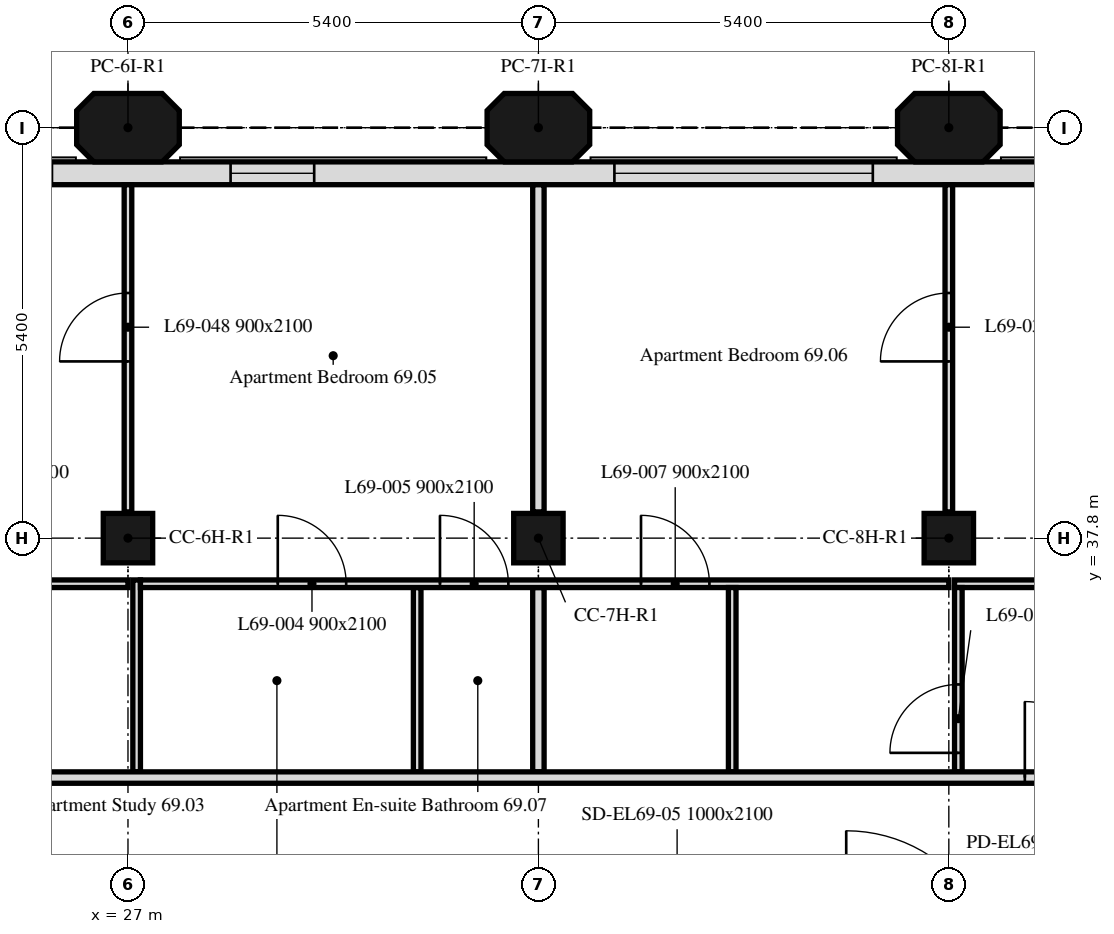
"""IFC4 building model, lengths in metres.
Left out: names, types, materials, properties, quantities, classifications, styles, units other than length and angle.
Written with IfcOpenShell. Run it as: python <this file> out.ifc"""

import sys

from ifc_helpers import new_model, si_unit, direction, frame, frame_2d, origin, origin_2d, place, context, subcontext, project, spatial, polyline, rectangle, outline, extrude, element, fill, save


model = new_model("IFC4")
c1 = context("Model", 3, precision=1e-05, world=origin(), true_north=direction((0.0, 1.0)))
c2 = subcontext(c1, "Body", "Model", "MODEL_VIEW")
j1 = project(units=[si_unit("LENGTHUNIT", "METRE"), si_unit("PLANEANGLEUNIT", "RADIAN")], contexts=[c1])
p1 = place(None, origin())
s1 = spatial("IfcSite", under=j1, at=p1, CompositionType="ELEMENT")
p2 = place(p1, origin())
s2 = spatial("IfcBuilding", under=s1, at=p2, CompositionType="ELEMENT")
p3 = place(p2, frame((0.0, 0.0, 281.8)))
s3 = spatial("IfcBuildingStorey", under=s2, at=p3, CompositionType="ELEMENT", Elevation=281.8)
for number, where, z_axis, x_axis in (
    (1, (27.0, 37.8, 0.0), (0.0, 0.0, 1.0), (1.0, 0.0, 0.0)),
    (2, (32.4, 37.8, 0.0), (0.0, 0.0, 1.0), (1.0, 0.0, 0.0)),
    (3, (37.8, 37.8, 0.0), (0.0, 0.0, 1.0), (1.0, 0.0, 0.0)),
):
    element("IfcColumn", number, at=place(p3, frame(where, z_axis=z_axis, x_axis=x_axis)), inside=s3, PredefinedType="COLUMN", context=c2, shape_type="SweptSolid", body=[
        extrude(rectangle(XDim=0.65, YDim=0.65, at=origin_2d()), origin(), (0.0, 0.0, 1.0), 3.0),
    ])
for number, where, z_axis, x_axis in (
    (4, (27.0, 43.2, 0.0), (0.0, 0.0, 1.0), (1.0, 0.0, 0.0)),
    (5, (32.4, 43.2, 0.0), (0.0, 0.0, 1.0), (1.0, 0.0, 0.0)),
    (6, (37.8, 43.2, 0.0), (0.0, 0.0, 1.0), (1.0, 0.0, 0.0)),
):
    element("IfcColumn", number, at=place(p3, frame(where, z_axis=z_axis, x_axis=x_axis)), inside=s3, PredefinedType="COLUMN", context=c2, shape_type="SweptSolid", body=[
        extrude(outline(polyline([(-0.45, -0.45), (0.45, -0.45), (0.675, -0.225), (0.675, 0.225), (0.45, 0.45), (-0.45, 0.45), (-0.675, 0.225), (-0.675, -0.225), (-0.45, -0.45)])), origin(), (0.0, 0.0, 1.0), 3.0),
    ])
p4 = place(p3, frame((43.014, 42.6, 0.0), z_axis=(0.0, 0.0, 1.0), x_axis=(-1.0, 0.0, 0.0)))
e7 = element("IfcWall", 7, at=p4, inside=s3, PredefinedType="SOLIDWALL", context=c2, shape_type="SweptSolid", body=[
    extrude(rectangle(XDim=32.027, YDim=0.3, at=frame_2d((16.014, 0.0))), origin(), (0.0, 0.0, 1.0), 3.0),
])
p5 = place(p4, frame((2.764, 0.0, 0.9)))
e8 = element("IfcOpeningElement", 8, at=p5, cuts=e7, PredefinedType="OPENING", context=c2, shape_type="SweptSolid", body=[
    extrude(rectangle(XDim=1.1, YDim=1.7, at=frame_2d((0.55, 0.85))), frame((0.0, 0.16, 0.0), z_axis=(0.0, -1.0, 0.0), x_axis=(1.0, 0.0, 0.0)), (0.0, 0.0, 1.0), 0.32),
])
p6 = place(p4, frame((6.214, 0.0, 0.9)))
e9 = element("IfcOpeningElement", 9, at=p6, cuts=e7, PredefinedType="OPENING", context=c2, shape_type="SweptSolid", body=[
    extrude(rectangle(XDim=3.4, YDim=1.7, at=frame_2d((1.7, 0.85))), frame((0.0, 0.16, 0.0), z_axis=(0.0, -1.0, 0.0), x_axis=(1.0, 0.0, 0.0)), (0.0, 0.0, 1.0), 0.32),
])
p7 = place(p4, frame((13.564, 0.0, 0.9)))
e10 = element("IfcOpeningElement", 10, at=p7, cuts=e7, PredefinedType="OPENING", context=c2, shape_type="SweptSolid", body=[
    extrude(rectangle(XDim=1.1, YDim=1.7, at=frame_2d((0.55, 0.85))), frame((0.0, 0.16, 0.0), z_axis=(0.0, -1.0, 0.0), x_axis=(1.0, 0.0, 0.0)), (0.0, 0.0, 1.0), 0.32),
])
p8 = place(p4, frame((17.014, 0.0, 0.9)))
e11 = element("IfcOpeningElement", 11, at=p8, cuts=e7, PredefinedType="OPENING", context=c2, shape_type="SweptSolid", body=[
    extrude(rectangle(XDim=3.4, YDim=1.7, at=frame_2d((1.7, 0.85))), frame((0.0, 0.16, 0.0), z_axis=(0.0, -1.0, 0.0), x_axis=(1.0, 0.0, 0.0)), (0.0, 0.0, 1.0), 0.32),
])
p9 = place(p4, frame((24.364, 0.0, 0.9)))
e12 = element("IfcOpeningElement", 12, at=p9, cuts=e7, PredefinedType="OPENING", context=c2, shape_type="SweptSolid", body=[
    extrude(rectangle(XDim=1.1, YDim=1.7, at=frame_2d((0.55, 0.85))), frame((0.0, 0.16, 0.0), z_axis=(0.0, -1.0, 0.0), x_axis=(1.0, 0.0, 0.0)), (0.0, 0.0, 1.0), 0.32),
])
p10 = place(p4, frame((27.814, 0.0, 0.9)))
e13 = element("IfcOpeningElement", 13, at=p10, cuts=e7, PredefinedType="OPENING", context=c2, shape_type="SweptSolid", body=[
    extrude(rectangle(XDim=3.4, YDim=1.7, at=frame_2d((1.7, 0.85))), frame((0.0, 0.16, 0.0), z_axis=(0.0, -1.0, 0.0), x_axis=(1.0, 0.0, 0.0)), (0.0, 0.0, 1.0), 0.32),
])
p11 = place(p3, frame((10.8, 37.2, 0.0), z_axis=(0.0, 0.0, 1.0), x_axis=(1.0, 0.0, 0.0)))
e14 = element("IfcWall", 14, at=p11, inside=s3, PredefinedType="PARTITIONING", context=c2, shape_type="SweptSolid", body=[
    extrude(rectangle(XDim=16.2, YDim=0.1, at=frame_2d((8.1, 0.0))), origin(), (0.0, 0.0, 1.0), 3.0),
])
p12 = place(p11, frame((2.995, 0.0, 0.0)))
e15 = element("IfcOpeningElement", 15, at=p12, cuts=e14, PredefinedType="OPENING", context=c2, shape_type="SweptSolid", body=[
    extrude(rectangle(XDim=0.9, YDim=2.1, at=frame_2d((0.45, 1.05))), frame((0.0, 0.05, 0.0), z_axis=(0.0, -1.0, 0.0), x_axis=(1.0, 0.0, 0.0)), (0.0, 0.0, 1.0), 0.1),
])
p13 = place(p11, frame((13.996, 0.0, 0.0)))
e16 = element("IfcOpeningElement", 16, at=p13, cuts=e14, PredefinedType="OPENING", context=c2, shape_type="SweptSolid", body=[
    extrude(rectangle(XDim=0.9, YDim=2.1, at=frame_2d((0.45, 1.05))), frame((0.0, 0.05, 0.0), z_axis=(0.0, -1.0, 0.0), x_axis=(1.0, 0.0, 0.0)), (0.0, 0.0, 1.0), 0.1),
])
p14 = place(p11, frame((6.928, 0.0, 0.0)))
e17 = element("IfcOpeningElement", 17, at=p14, cuts=e14, PredefinedType="OPENING", context=c2, shape_type="SweptSolid", body=[
    extrude(rectangle(XDim=0.9, YDim=2.1, at=frame_2d((0.45, 1.05))), frame((0.0, 0.05, 0.0), z_axis=(0.0, -1.0, 0.0), x_axis=(1.0, 0.0, 0.0)), (0.0, 0.0, 1.0), 0.1),
])
p15 = place(p11, frame((8.428, 0.0, 0.0)))
e18 = element("IfcOpeningElement", 18, at=p15, cuts=e14, PredefinedType="OPENING", context=c2, shape_type="SweptSolid", body=[
    extrude(rectangle(XDim=0.9, YDim=2.1, at=frame_2d((0.45, 1.05))), frame((0.0, 0.05, 0.0), z_axis=(0.0, -1.0, 0.0), x_axis=(1.0, 0.0, 0.0)), (0.0, 0.0, 1.0), 0.1),
])
p16 = place(p3, frame((27.0, 38.145, 0.0), z_axis=(0.0, 0.0, 1.0), x_axis=(0.0, 1.0, 0.0)))
e19 = element("IfcWall", 19, at=p16, inside=s3, PredefinedType="PARTITIONING", context=c2, shape_type="SweptSolid", body=[
    extrude(rectangle(XDim=4.304, YDim=0.1, at=frame_2d((2.152, 0.0))), origin(), (0.0, 0.0, 1.0), 3.0),
])
p17 = place(p16, frame((1.98, 0.0, 0.0)))
e20 = element("IfcOpeningElement", 20, at=p17, cuts=e19, PredefinedType="OPENING", context=c2, shape_type="SweptSolid", body=[
    extrude(rectangle(XDim=0.9, YDim=2.1, at=frame_2d((0.45, 1.05))), frame((0.0, 0.05, 0.0), z_axis=(0.0, -1.0, 0.0), x_axis=(1.0, 0.0, 0.0)), (0.0, 0.0, 1.0), 0.1),
])
p18 = place(p3, frame((32.4, 38.145, 0.0), z_axis=(0.0, 0.0, 1.0), x_axis=(0.0, 1.0, 0.0)))
e21 = element("IfcWall", 21, at=p18, inside=s3, PredefinedType="PARTITIONING", context=c2, shape_type="SweptSolid", body=[
    extrude(rectangle(XDim=4.304, YDim=0.15, at=frame_2d((2.152, 0.0))), origin(), (0.0, 0.0, 1.0), 3.0),
])
p19 = place(p3, frame((27.114, 34.725, 0.0), z_axis=(0.0, 0.0, 1.0), x_axis=(0.0, 1.0, 0.0)))
e22 = element("IfcWall", 22, at=p19, inside=s3, PredefinedType="PARTITIONING", context=c2, shape_type="SweptSolid", body=[
    extrude(rectangle(XDim=2.525, YDim=0.1, at=frame_2d((1.262, 0.0))), origin(), (0.0, 0.0, 1.0), 3.0),
])
p20 = place(p3, frame((30.805, 34.725, 0.0), z_axis=(0.0, 0.0, 1.0), x_axis=(0.0, 1.0, 0.0)))
e23 = element("IfcWall", 23, at=p20, inside=s3, PredefinedType="PARTITIONING", context=c2, shape_type="SweptSolid", body=[
    extrude(rectangle(XDim=2.425, YDim=0.1, at=frame_2d((1.212, 0.0))), origin(), (0.0, 0.0, 1.0), 3.0),
])
p21 = place(p3, frame((32.4, 34.725, 0.0), z_axis=(0.0, 0.0, 1.0), x_axis=(0.0, 1.0, 0.0)))
e24 = element("IfcWall", 24, at=p21, inside=s3, PredefinedType="PARTITIONING", context=c2, shape_type="SweptSolid", body=[
    extrude(rectangle(XDim=2.425, YDim=0.15, at=frame_2d((1.212, 0.0))), origin(), (0.0, 0.0, 1.0), 3.0),
])
p22 = place(p3, frame((27.164, 37.2, 0.0), z_axis=(0.0, 0.0, 1.0), x_axis=(1.0, 0.0, 0.0)))
e25 = element("IfcWall", 25, at=p22, inside=s3, PredefinedType="PARTITIONING", context=c2, shape_type="SweptSolid", body=[
    extrude(rectangle(XDim=10.636, YDim=0.1, at=frame_2d((5.318, 0.0))), origin(), (0.0, 0.0, 1.0), 3.0),
])
p23 = place(p22, frame((1.807, 0.0, 0.0)))
e26 = element("IfcOpeningElement", 26, at=p23, cuts=e25, PredefinedType="OPENING", context=c2, shape_type="SweptSolid", body=[
    extrude(rectangle(XDim=0.9, YDim=2.1, at=frame_2d((0.45, 1.05))), frame((0.0, 0.05, 0.0), z_axis=(0.0, -1.0, 0.0), x_axis=(1.0, 0.0, 0.0)), (0.0, 0.0, 1.0), 0.1),
])
p24 = place(p22, frame((3.941, 0.0, 0.0)))
e27 = element("IfcOpeningElement", 27, at=p24, cuts=e25, PredefinedType="OPENING", context=c2, shape_type="SweptSolid", body=[
    extrude(rectangle(XDim=0.9, YDim=2.1, at=frame_2d((0.45, 1.05))), frame((0.0, 0.05, 0.0), z_axis=(0.0, -1.0, 0.0), x_axis=(1.0, 0.0, 0.0)), (0.0, 0.0, 1.0), 0.1),
])
p25 = place(p22, frame((6.586, 0.0, 0.0)))
e28 = element("IfcOpeningElement", 28, at=p25, cuts=e25, PredefinedType="OPENING", context=c2, shape_type="SweptSolid", body=[
    extrude(rectangle(XDim=0.9, YDim=2.1, at=frame_2d((0.45, 1.05))), frame((0.0, 0.05, 0.0), z_axis=(0.0, -1.0, 0.0), x_axis=(1.0, 0.0, 0.0)), (0.0, 0.0, 1.0), 0.1),
])
p26 = place(p3, frame((37.8, 38.145, 0.0), z_axis=(0.0, 0.0, 1.0), x_axis=(0.0, 1.0, 0.0)))
e29 = element("IfcWall", 29, at=p26, inside=s3, PredefinedType="PARTITIONING", context=c2, shape_type="SweptSolid", body=[
    extrude(rectangle(XDim=4.304, YDim=0.1, at=frame_2d((2.152, 0.0))), origin(), (0.0, 0.0, 1.0), 3.0),
])
p27 = place(p26, frame((1.98, 0.0, 0.0)))
e30 = element("IfcOpeningElement", 30, at=p27, cuts=e29, PredefinedType="OPENING", context=c2, shape_type="SweptSolid", body=[
    extrude(rectangle(XDim=0.9, YDim=2.1, at=frame_2d((0.45, 1.05))), frame((0.0, 0.05, 0.0), z_axis=(0.0, -1.0, 0.0), x_axis=(1.0, 0.0, 0.0)), (0.0, 0.0, 1.0), 0.1),
])
p28 = place(p3, frame((37.875, 37.2, 0.0), z_axis=(0.0, 0.0, 1.0), x_axis=(1.0, 0.0, 0.0)))
e31 = element("IfcWall", 31, at=p28, inside=s3, PredefinedType="PARTITIONING", context=c2, shape_type="SweptSolid", body=[
    extrude(rectangle(XDim=9.974, YDim=0.1, at=frame_2d((4.987, 0.0))), origin(), (0.0, 0.0, 1.0), 3.0),
])
p29 = place(p28, frame((7.165, 0.0, 0.0)))
e32 = element("IfcOpeningElement", 32, at=p29, cuts=e31, PredefinedType="OPENING", context=c2, shape_type="SweptSolid", body=[
    extrude(rectangle(XDim=0.9, YDim=2.1, at=frame_2d((0.45, 1.05))), frame((0.0, 0.05, 0.0), z_axis=(0.0, -1.0, 0.0), x_axis=(1.0, 0.0, 0.0)), (0.0, 0.0, 1.0), 0.1),
])
p30 = place(p28, frame((8.824, 0.0, 0.0)))
e33 = element("IfcOpeningElement", 33, at=p30, cuts=e31, PredefinedType="OPENING", context=c2, shape_type="SweptSolid", body=[
    extrude(rectangle(XDim=0.9, YDim=2.1, at=frame_2d((0.45, 1.05))), frame((0.0, 0.05, 0.0), z_axis=(0.0, -1.0, 0.0), x_axis=(1.0, 0.0, 0.0)), (0.0, 0.0, 1.0), 0.1),
])
p31 = place(p28, frame((1.6, 0.0, 0.0)))
e34 = element("IfcOpeningElement", 34, at=p31, cuts=e31, PredefinedType="OPENING", context=c2, shape_type="SweptSolid", body=[
    extrude(rectangle(XDim=0.9, YDim=2.1, at=frame_2d((0.45, 1.05))), frame((0.0, 0.05, 0.0), z_axis=(0.0, -1.0, 0.0), x_axis=(1.0, 0.0, 0.0)), (0.0, 0.0, 1.0), 0.1),
])
p32 = place(p3, frame((34.95, 34.725, 0.0), z_axis=(0.0, 0.0, 1.0), x_axis=(0.0, 1.0, 0.0)))
e35 = element("IfcWall", 35, at=p32, inside=s3, PredefinedType="PARTITIONING", context=c2, shape_type="SweptSolid", body=[
    extrude(rectangle(XDim=2.425, YDim=0.1, at=frame_2d((1.212, 0.0))), origin(), (0.0, 0.0, 1.0), 3.0),
])
p33 = place(p3, frame((37.925, 34.725, 0.0), z_axis=(0.0, 0.0, 1.0), x_axis=(0.0, 1.0, 0.0)))
e36 = element("IfcWall", 36, at=p33, inside=s3, PredefinedType="PARTITIONING", context=c2, shape_type="SweptSolid", body=[
    extrude(rectangle(XDim=2.425, YDim=0.1, at=frame_2d((1.212, 0.0))), origin(), (0.0, 0.0, 1.0), 3.0),
])
p34 = place(p33, frame((0.25, 0.0, 0.0)))
e37 = element("IfcOpeningElement", 37, at=p34, cuts=e36, PredefinedType="OPENING", context=c2, shape_type="SweptSolid", body=[
    extrude(rectangle(XDim=0.9, YDim=2.1, at=frame_2d((0.45, 1.05))), frame((0.0, 0.05, 0.0), z_axis=(0.0, -1.0, 0.0), x_axis=(1.0, 0.0, 0.0)), (0.0, 0.0, 1.0), 0.1),
])
p35 = place(p3, frame((6.151, 34.65, 0.0), z_axis=(0.0, 0.0, 1.0), x_axis=(1.0, 0.0, 0.0)))
e38 = element("IfcWall", 38, at=p35, inside=s3, PredefinedType="PARTITIONING", context=c2, shape_type="SweptSolid", body=[
    extrude(rectangle(XDim=41.698, YDim=0.15, at=frame_2d((20.849, 0.0))), origin(), (0.0, 0.0, 1.0), 3.0),
])
p36 = place(p35, frame((2.519, 0.0, 0.0)))
e39 = element("IfcOpeningElement", 39, at=p36, cuts=e38, PredefinedType="OPENING", context=c2, shape_type="SweptSolid", body=[
    extrude(rectangle(XDim=1.0, YDim=2.1, at=frame_2d((0.5, 1.05))), frame((0.0, 0.075, 0.0), z_axis=(0.0, -1.0, 0.0), x_axis=(1.0, 0.0, 0.0)), (0.0, 0.0, 1.0), 0.15),
])
p37 = place(p35, frame((13.077, 0.0, 0.0)))
e40 = element("IfcOpeningElement", 40, at=p37, cuts=e38, PredefinedType="OPENING", context=c2, shape_type="SweptSolid", body=[
    extrude(rectangle(XDim=1.0, YDim=2.1, at=frame_2d((0.5, 1.05))), frame((0.0, 0.075, 0.0), z_axis=(0.0, -1.0, 0.0), x_axis=(1.0, 0.0, 0.0)), (0.0, 0.0, 1.0), 0.15),
])
p38 = place(p35, frame((32.649, 0.0, 0.0)))
e41 = element("IfcOpeningElement", 41, at=p38, cuts=e38, PredefinedType="OPENING", context=c2, shape_type="SweptSolid", body=[
    extrude(rectangle(XDim=1.0, YDim=2.1, at=frame_2d((0.5, 1.05))), frame((0.0, 0.075, 0.0), z_axis=(0.0, -1.0, 0.0), x_axis=(1.0, 0.0, 0.0)), (0.0, 0.0, 1.0), 0.15),
])
p39 = place(p6, origin())
e42 = element("IfcWindow", 42, at=p39, inside=s3, PartitioningType="SINGLE_PANEL", PredefinedType="WINDOW", context=c2, shape_type="SweptSolid", body=[
    extrude(rectangle(XDim=3.4, YDim=1.7, at=frame_2d((1.7, 0.85))), frame((0.0, 0.03, 0.0), z_axis=(0.0, -1.0, 0.0), x_axis=(1.0, 0.0, 0.0)), (0.0, 0.0, 1.0), 0.06),
])
fill(e9, e42)
p40 = place(p7, origin())
e43 = element("IfcWindow", 43, at=p40, inside=s3, PartitioningType="SINGLE_PANEL", PredefinedType="WINDOW", context=c2, shape_type="SweptSolid", body=[
    extrude(rectangle(XDim=1.1, YDim=1.7, at=frame_2d((0.55, 0.85))), frame((0.0, 0.03, 0.0), z_axis=(0.0, -1.0, 0.0), x_axis=(1.0, 0.0, 0.0)), (0.0, 0.0, 1.0), 0.06),
])
fill(e10, e43)
p41 = place(p23, origin())
e44 = element("IfcDoor", 44, at=p41, inside=s3, OperationType="SINGLE_SWING_LEFT", PredefinedType="DOOR", context=c2, shape_type="SweptSolid", body=[
    extrude(rectangle(XDim=0.9, YDim=2.1, at=frame_2d((0.45, 1.05))), frame((0.0, 0.025, 0.0), z_axis=(0.0, -1.0, 0.0), x_axis=(1.0, 0.0, 0.0)), (0.0, 0.0, 1.0), 0.05),
])
fill(e26, e44)
p42 = place(p24, origin())
e45 = element("IfcDoor", 45, at=p42, inside=s3, OperationType="SINGLE_SWING_RIGHT", PredefinedType="DOOR", context=c2, shape_type="SweptSolid", body=[
    extrude(rectangle(XDim=0.9, YDim=2.1, at=frame_2d((0.45, 1.05))), frame((0.0, 0.025, 0.0), z_axis=(0.0, -1.0, 0.0), x_axis=(1.0, 0.0, 0.0)), (0.0, 0.0, 1.0), 0.05),
])
fill(e27, e45)
p43 = place(p25, origin())
e46 = element("IfcDoor", 46, at=p43, inside=s3, OperationType="SINGLE_SWING_LEFT", PredefinedType="DOOR", context=c2, shape_type="SweptSolid", body=[
    extrude(rectangle(XDim=0.9, YDim=2.1, at=frame_2d((0.45, 1.05))), frame((0.0, 0.025, 0.0), z_axis=(0.0, -1.0, 0.0), x_axis=(1.0, 0.0, 0.0)), (0.0, 0.0, 1.0), 0.05),
])
fill(e28, e46)
p44 = place(p34, origin())
e47 = element("IfcDoor", 47, at=p44, inside=s3, OperationType="SINGLE_SWING_LEFT", PredefinedType="DOOR", context=c2, shape_type="SweptSolid", body=[
    extrude(rectangle(XDim=0.9, YDim=2.1, at=frame_2d((0.45, 1.05))), frame((0.0, 0.025, 0.0), z_axis=(0.0, -1.0, 0.0), x_axis=(1.0, 0.0, 0.0)), (0.0, 0.0, 1.0), 0.05),
])
fill(e37, e47)
p45 = place(p27, origin())
e48 = element("IfcDoor", 48, at=p45, inside=s3, OperationType="SINGLE_SWING_RIGHT", PredefinedType="DOOR", context=c2, shape_type="SweptSolid", body=[
    extrude(rectangle(XDim=0.9, YDim=2.1, at=frame_2d((0.45, 1.05))), frame((0.0, 0.025, 0.0), z_axis=(0.0, -1.0, 0.0), x_axis=(1.0, 0.0, 0.0)), (0.0, 0.0, 1.0), 0.05),
])
fill(e30, e48)
p46 = place(p17, origin())
e49 = element("IfcDoor", 49, at=p46, inside=s3, OperationType="SINGLE_SWING_LEFT", PredefinedType="DOOR", context=c2, shape_type="SweptSolid", body=[
    extrude(rectangle(XDim=0.9, YDim=2.1, at=frame_2d((0.45, 1.05))), frame((0.0, 0.025, 0.0), z_axis=(0.0, -1.0, 0.0), x_axis=(1.0, 0.0, 0.0)), (0.0, 0.0, 1.0), 0.05),
])
fill(e20, e49)
p47 = place(p38, origin())
e50 = element("IfcDoor", 50, at=p47, inside=s3, OperationType="SINGLE_SWING_RIGHT", PredefinedType="DOOR", context=c2, shape_type="SweptSolid", body=[
    extrude(rectangle(XDim=1.0, YDim=2.1, at=frame_2d((0.5, 1.05))), frame((0.0, 0.025, 0.0), z_axis=(0.0, -1.0, 0.0), x_axis=(1.0, 0.0, 0.0)), (0.0, 0.0, 1.0), 0.05),
])
fill(e41, e50)
save(model, sys.argv[1])
